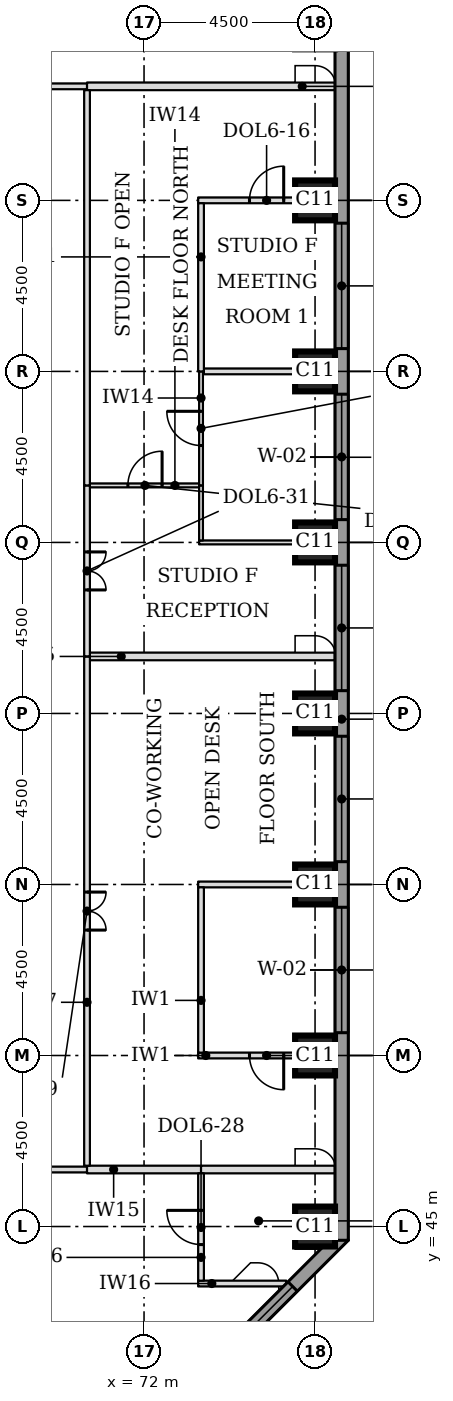
"""IFC4 building model, lengths in metres.
Left out: names, types, materials, properties, quantities, classifications, styles, units other than length and angle.
Written with IfcOpenShell. Run it as: python <this file> out.ifc"""

import sys

from ifc_helpers import new_model, si_unit, direction, frame, frame_2d, origin, origin_2d, place, context, subcontext, project, spatial, rectangle, extrude, element, fill, save


model = new_model("IFC4")
c1 = context("Model", 3, precision=1e-05, world=origin(), true_north=direction((0.0, 1.0)))
c2 = subcontext(c1, "Body", "Model", "MODEL_VIEW")
j1 = project(units=[si_unit("LENGTHUNIT", "METRE"), si_unit("PLANEANGLEUNIT", "RADIAN")], contexts=[c1])
p1 = place(None, origin())
s1 = spatial("IfcSite", under=j1, at=p1, CompositionType="ELEMENT")
p2 = place(p1, origin())
s2 = spatial("IfcBuilding", under=s1, at=p2, CompositionType="ELEMENT")
p3 = place(p2, frame((0.0, 0.0, 115.9)))
s3 = spatial("IfcBuildingStorey", under=s2, at=p3, CompositionType="ELEMENT", Elevation=115.9)
for number, where, z_axis, x_axis in (
    (1, (76.5, 45.0, 0.0), (0.0, 0.0, 1.0), (1.0, 0.0, 0.0)),
    (2, (76.5, 49.5, 0.0), (0.0, 0.0, 1.0), (1.0, 0.0, 0.0)),
    (3, (76.5, 54.0, 0.0), (0.0, 0.0, 1.0), (1.0, 0.0, 0.0)),
    (4, (76.5, 58.5, 0.0), (0.0, 0.0, 1.0), (1.0, 0.0, 0.0)),
    (5, (76.5, 63.0, 0.0), (0.0, 0.0, 1.0), (1.0, 0.0, 0.0)),
    (6, (76.5, 67.5, 0.0), (0.0, 0.0, 1.0), (1.0, 0.0, 0.0)),
    (7, (76.5, 72.0, 0.0), (0.0, 0.0, 1.0), (1.0, 0.0, 0.0)),
):
    element("IfcColumn", number, at=place(p3, frame(where, z_axis=z_axis, x_axis=x_axis)), inside=s3, PredefinedType="COLUMN", context=c2, shape_type="SweptSolid", body=[
        extrude(rectangle(XDim=1.05, YDim=1.05, at=origin_2d()), origin(), (0.0, 0.0, 1.0), 3.7),
    ])
p4 = place(p3, frame((72.239, 39.749, 0.0), z_axis=(0.0, 0.0, 1.0), x_axis=(0.707106781187, 0.707106781187, 0.0)))
e8 = element("IfcWall", 8, at=p4, inside=s3, PredefinedType="STANDARD", context=c2, shape_type="SweptSolid", body=[
    extrude(rectangle(XDim=7.089, YDim=0.35, at=frame_2d((3.544, 0.0))), origin(), (0.0, 0.0, 1.0), 3.525),
])
p5 = place(p4, frame((1.894, 0.0, 0.9)))
e9 = element("IfcOpeningElement", 9, at=p5, cuts=e8, PredefinedType="OPENING", context=c2, shape_type="SweptSolid", body=[
    extrude(rectangle(XDim=3.3, YDim=1.9, at=frame_2d((1.65, 0.95))), frame((0.0, 0.185, 0.0), z_axis=(0.0, -1.0, 0.0), x_axis=(1.0, 0.0, 0.0)), (0.0, 0.0, 1.0), 0.37),
])
p6 = place(p3, frame((77.2, 44.638, 0.0), z_axis=(0.0, 0.0, 1.0), x_axis=(0.0, 1.0, 0.0)))
e10 = element("IfcWall", 10, at=p6, inside=s3, PredefinedType="STANDARD", context=c2, shape_type="SweptSolid", body=[
    extrude(rectangle(XDim=32.225, YDim=0.35, at=frame_2d((16.112, 0.0))), origin(), (0.0, 0.0, 1.0), 3.525),
])
p7 = place(p6, frame((5.462, 0.0, 0.9)))
e11 = element("IfcOpeningElement", 11, at=p7, cuts=e10, PredefinedType="OPENING", context=c2, shape_type="SweptSolid", body=[
    extrude(rectangle(XDim=3.3, YDim=1.9, at=frame_2d((1.65, 0.95))), frame((0.0, 0.185, 0.0), z_axis=(0.0, -1.0, 0.0), x_axis=(1.0, 0.0, 0.0)), (0.0, 0.0, 1.0), 0.37),
])
p8 = place(p6, frame((9.962, 0.0, 0.9)))
e12 = element("IfcOpeningElement", 12, at=p8, cuts=e10, PredefinedType="OPENING", context=c2, shape_type="SweptSolid", body=[
    extrude(rectangle(XDim=3.3, YDim=1.9, at=frame_2d((1.65, 0.95))), frame((0.0, 0.185, 0.0), z_axis=(0.0, -1.0, 0.0), x_axis=(1.0, 0.0, 0.0)), (0.0, 0.0, 1.0), 0.37),
])
p9 = place(p6, frame((14.462, 0.0, 0.9)))
e13 = element("IfcOpeningElement", 13, at=p9, cuts=e10, PredefinedType="OPENING", context=c2, shape_type="SweptSolid", body=[
    extrude(rectangle(XDim=3.3, YDim=1.9, at=frame_2d((1.65, 0.95))), frame((0.0, 0.185, 0.0), z_axis=(0.0, -1.0, 0.0), x_axis=(1.0, 0.0, 0.0)), (0.0, 0.0, 1.0), 0.37),
])
p10 = place(p6, frame((18.962, 0.0, 0.9)))
e14 = element("IfcOpeningElement", 14, at=p10, cuts=e10, PredefinedType="OPENING", context=c2, shape_type="SweptSolid", body=[
    extrude(rectangle(XDim=3.3, YDim=1.9, at=frame_2d((1.65, 0.95))), frame((0.0, 0.185, 0.0), z_axis=(0.0, -1.0, 0.0), x_axis=(1.0, 0.0, 0.0)), (0.0, 0.0, 1.0), 0.37),
])
p11 = place(p6, frame((23.462, 0.0, 0.9)))
e15 = element("IfcOpeningElement", 15, at=p11, cuts=e10, PredefinedType="OPENING", context=c2, shape_type="SweptSolid", body=[
    extrude(rectangle(XDim=3.3, YDim=1.9, at=frame_2d((1.65, 0.95))), frame((0.0, 0.185, 0.0), z_axis=(0.0, -1.0, 0.0), x_axis=(1.0, 0.0, 0.0)), (0.0, 0.0, 1.0), 0.37),
])
p12 = place(p3, frame((73.425, 43.5, 0.0), z_axis=(0.0, 0.0, 1.0), x_axis=(1.0, 0.0, 0.0)))
e16 = element("IfcWall", 16, at=p12, inside=s3, PredefinedType="PARTITIONING", context=c2, shape_type="SweptSolid", body=[
    extrude(rectangle(XDim=2.317, YDim=0.15, at=frame_2d((1.159, 0.0))), origin(), (0.0, 0.0, 1.0), 3.55),
])
p13 = place(p3, frame((54.0, 46.5, 0.0), z_axis=(0.0, 0.0, 1.0), x_axis=(1.0, 0.0, 0.0)))
e17 = element("IfcWall", 17, at=p13, inside=s3, PredefinedType="PARTITIONING", context=c2, shape_type="SweptSolid", body=[
    extrude(rectangle(XDim=16.5, YDim=0.15, at=frame_2d((8.25, 0.0))), origin(), (0.0, 0.0, 1.0), 3.55),
])
p14 = place(p3, frame((70.5, 46.5, 0.0), z_axis=(0.0, 0.0, 1.0), x_axis=(1.0, 0.0, 0.0)))
e18 = element("IfcWall", 18, at=p14, inside=s3, PredefinedType="PARTITIONING", context=c2, shape_type="SweptSolid", body=[
    extrude(rectangle(XDim=3.0, YDim=0.2, at=frame_2d((1.5, 0.0))), origin(), (0.0, 0.0, 1.0), 3.55),
])
p15 = place(p3, frame((73.5, 46.5, 0.0), z_axis=(0.0, 0.0, 1.0), x_axis=(1.0, 0.0, 0.0)))
e19 = element("IfcWall", 19, at=p15, inside=s3, PredefinedType="PARTITIONING", context=c2, shape_type="SweptSolid", body=[
    extrude(rectangle(XDim=3.525, YDim=0.2, at=frame_2d((1.762, 0.0))), origin(), (0.0, 0.0, 1.0), 3.55),
])
p16 = place(p3, frame((73.425, 49.5, 0.0), z_axis=(0.0, 0.0, 1.0), x_axis=(1.0, 0.0, 0.0)))
e20 = element("IfcWall", 20, at=p16, inside=s3, PredefinedType="PARTITIONING", context=c2, shape_type="SweptSolid", body=[
    extrude(rectangle(XDim=3.6, YDim=0.15, at=frame_2d((1.8, 0.0))), origin(), (0.0, 0.0, 1.0), 3.55),
])
p17 = place(p16, frame((1.35, 0.0, 0.0)))
e21 = element("IfcOpeningElement", 21, at=p17, cuts=e20, PredefinedType="OPENING", context=c2, shape_type="SweptSolid", body=[
    extrude(rectangle(XDim=0.9, YDim=2.1, at=frame_2d((0.45, 1.05))), frame((0.0, 0.085, 0.0), z_axis=(0.0, -1.0, 0.0), x_axis=(1.0, 0.0, 0.0)), (0.0, 0.0, 1.0), 0.17),
])
p18 = place(p3, frame((73.425, 54.0, 0.0), z_axis=(0.0, 0.0, 1.0), x_axis=(1.0, 0.0, 0.0)))
e22 = element("IfcWall", 22, at=p18, inside=s3, PredefinedType="PARTITIONING", context=c2, shape_type="SweptSolid", body=[
    extrude(rectangle(XDim=3.6, YDim=0.15, at=frame_2d((1.8, 0.0))), origin(), (0.0, 0.0, 1.0), 3.55),
])
p19 = place(p3, frame((70.575, 60.0, 0.0), z_axis=(0.0, 0.0, 1.0), x_axis=(1.0, 0.0, 0.0)))
e23 = element("IfcWall", 23, at=p19, inside=s3, PredefinedType="PARTITIONING", context=c2, shape_type="SweptSolid", body=[
    extrude(rectangle(XDim=6.45, YDim=0.2, at=frame_2d((3.225, 0.0))), origin(), (0.0, 0.0, 1.0), 3.55),
])
p20 = place(p3, frame((73.45, 63.0, 0.0), z_axis=(0.0, 0.0, 1.0), x_axis=(1.0, 0.0, 0.0)))
e24 = element("IfcWall", 24, at=p20, inside=s3, PredefinedType="PARTITIONING", context=c2, shape_type="SweptSolid", body=[
    extrude(rectangle(XDim=3.575, YDim=0.1, at=frame_2d((1.788, 0.0))), origin(), (0.0, 0.0, 1.0), 3.55),
])
p21 = place(p3, frame((70.575, 64.5, 0.0), z_axis=(0.0, 0.0, 1.0), x_axis=(1.0, 0.0, 0.0)))
e25 = element("IfcWall", 25, at=p21, inside=s3, PredefinedType="PARTITIONING", context=c2, shape_type="SweptSolid", body=[
    extrude(rectangle(XDim=2.875, YDim=0.1, at=frame_2d((1.438, 0.0))), origin(), (0.0, 0.0, 1.0), 3.55),
])
p22 = place(p21, frame((1.0, 0.0, 0.0)))
e26 = element("IfcOpeningElement", 26, at=p22, cuts=e25, PredefinedType="OPENING", context=c2, shape_type="SweptSolid", body=[
    extrude(rectangle(XDim=0.9, YDim=2.1, at=frame_2d((0.45, 1.05))), frame((0.0, 0.06, 0.0), z_axis=(0.0, -1.0, 0.0), x_axis=(1.0, 0.0, 0.0)), (0.0, 0.0, 1.0), 0.12),
])
p23 = place(p3, frame((73.575, 67.5, 0.0), z_axis=(0.0, 0.0, 1.0), x_axis=(1.0, 0.0, 0.0)))
e27 = element("IfcWall", 27, at=p23, inside=s3, PredefinedType="PARTITIONING", context=c2, shape_type="SweptSolid", body=[
    extrude(rectangle(XDim=3.45, YDim=0.15, at=frame_2d((1.725, 0.0))), origin(), (0.0, 0.0, 1.0), 3.55),
])
p24 = place(p3, frame((73.425, 72.0, 0.0), z_axis=(0.0, 0.0, 1.0), x_axis=(1.0, 0.0, 0.0)))
e28 = element("IfcWall", 28, at=p24, inside=s3, PredefinedType="PARTITIONING", context=c2, shape_type="SweptSolid", body=[
    extrude(rectangle(XDim=3.6, YDim=0.15, at=frame_2d((1.8, 0.0))), origin(), (0.0, 0.0, 1.0), 3.55),
])
p25 = place(p24, frame((1.35, 0.0, 0.0)))
e29 = element("IfcOpeningElement", 29, at=p25, cuts=e28, PredefinedType="OPENING", context=c2, shape_type="SweptSolid", body=[
    extrude(rectangle(XDim=0.9, YDim=2.1, at=frame_2d((0.45, 1.05))), frame((0.0, 0.085, 0.0), z_axis=(0.0, -1.0, 0.0), x_axis=(1.0, 0.0, 0.0)), (0.0, 0.0, 1.0), 0.17),
])
p26 = place(p3, frame((58.5, 75.0, 0.0), z_axis=(0.0, 0.0, 1.0), x_axis=(1.0, 0.0, 0.0)))
e30 = element("IfcWall", 30, at=p26, inside=s3, PredefinedType="PARTITIONING", context=c2, shape_type="SweptSolid", body=[
    extrude(rectangle(XDim=12.0, YDim=0.15, at=frame_2d((6.0, 0.0))), origin(), (0.0, 0.0, 1.0), 3.55),
])
p27 = place(p3, frame((70.5, 75.0, 0.0), z_axis=(0.0, 0.0, 1.0), x_axis=(1.0, 0.0, 0.0)))
e31 = element("IfcWall", 31, at=p27, inside=s3, PredefinedType="PARTITIONING", context=c2, shape_type="SweptSolid", body=[
    extrude(rectangle(XDim=6.525, YDim=0.2, at=frame_2d((3.262, 0.0))), origin(), (0.0, 0.0, 1.0), 3.55),
])
p28 = place(p3, frame((73.5, 43.575, 0.0), z_axis=(0.0, 0.0, 1.0), x_axis=(0.0, 1.0, 0.0)))
e32 = element("IfcWall", 32, at=p28, inside=s3, PredefinedType="PARTITIONING", context=c2, shape_type="SweptSolid", body=[
    extrude(rectangle(XDim=2.825, YDim=0.15, at=frame_2d((1.413, 0.0))), origin(), (0.0, 0.0, 1.0), 3.55),
])
p29 = place(p28, frame((0.95, 0.0, 0.0)))
e33 = element("IfcOpeningElement", 33, at=p29, cuts=e32, PredefinedType="OPENING", context=c2, shape_type="SweptSolid", body=[
    extrude(rectangle(XDim=0.9, YDim=2.1, at=frame_2d((0.45, 1.05))), frame((0.0, 0.085, 0.0), z_axis=(0.0, -1.0, 0.0), x_axis=(1.0, 0.0, 0.0)), (0.0, 0.0, 1.0), 0.17),
])
p30 = place(p3, frame((70.5, 46.6, 0.0), z_axis=(0.0, 0.0, 1.0), x_axis=(0.0, 1.0, 0.0)))
e34 = element("IfcWall", 34, at=p30, inside=s3, PredefinedType="PARTITIONING", context=c2, shape_type="SweptSolid", body=[
    extrude(rectangle(XDim=13.4, YDim=0.15, at=frame_2d((6.7, 0.0))), origin(), (0.0, 0.0, 1.0), 3.55),
])
p31 = place(p30, frame((6.2, 0.0, 0.0)))
e35 = element("IfcOpeningElement", 35, at=p31, cuts=e34, PredefinedType="OPENING", context=c2, shape_type="SweptSolid", body=[
    extrude(rectangle(XDim=1.0, YDim=2.1, at=frame_2d((0.5, 1.05))), frame((0.0, 0.085, 0.0), z_axis=(0.0, -1.0, 0.0), x_axis=(1.0, 0.0, 0.0)), (0.0, 0.0, 1.0), 0.17),
])
p32 = place(p3, frame((73.5, 49.575, 0.0), z_axis=(0.0, 0.0, 1.0), x_axis=(0.0, 1.0, 0.0)))
e36 = element("IfcWall", 36, at=p32, inside=s3, PredefinedType="PARTITIONING", context=c2, shape_type="SweptSolid", body=[
    extrude(rectangle(XDim=4.35, YDim=0.15, at=frame_2d((2.175, 0.0))), origin(), (0.0, 0.0, 1.0), 3.55),
])
p33 = place(p3, frame((70.5, 60.0, 0.0), z_axis=(0.0, 0.0, 1.0), x_axis=(0.0, 1.0, 0.0)))
e37 = element("IfcWall", 37, at=p33, inside=s3, PredefinedType="PARTITIONING", context=c2, shape_type="SweptSolid", body=[
    extrude(rectangle(XDim=4.5, YDim=0.15, at=frame_2d((2.25, 0.0))), origin(), (0.0, 0.0, 1.0), 3.55),
])
p34 = place(p33, frame((1.75, 0.0, 0.0)))
e38 = element("IfcOpeningElement", 38, at=p34, cuts=e37, PredefinedType="OPENING", context=c2, shape_type="SweptSolid", body=[
    extrude(rectangle(XDim=1.0, YDim=2.1, at=frame_2d((0.5, 1.05))), frame((0.0, 0.085, 0.0), z_axis=(0.0, -1.0, 0.0), x_axis=(1.0, 0.0, 0.0)), (0.0, 0.0, 1.0), 0.17),
])
p35 = place(p3, frame((73.5, 63.05, 0.0), z_axis=(0.0, 0.0, 1.0), x_axis=(0.0, 1.0, 0.0)))
e39 = element("IfcWall", 39, at=p35, inside=s3, PredefinedType="PARTITIONING", context=c2, shape_type="SweptSolid", body=[
    extrude(rectangle(XDim=1.45, YDim=0.1, at=frame_2d((0.725, 0.0))), origin(), (0.0, 0.0, 1.0), 3.55),
])
p36 = place(p3, frame((70.5, 64.5, 0.0), z_axis=(0.0, 0.0, 1.0), x_axis=(0.0, 1.0, 0.0)))
e40 = element("IfcWall", 40, at=p36, inside=s3, PredefinedType="PARTITIONING", context=c2, shape_type="SweptSolid", body=[
    extrude(rectangle(XDim=10.4, YDim=0.15, at=frame_2d((5.2, 0.0))), origin(), (0.0, 0.0, 1.0), 3.55),
])
p37 = place(p3, frame((73.5, 64.5, 0.0), z_axis=(0.0, 0.0, 1.0), x_axis=(0.0, 1.0, 0.0)))
e41 = element("IfcWall", 41, at=p37, inside=s3, PredefinedType="PARTITIONING", context=c2, shape_type="SweptSolid", body=[
    extrude(rectangle(XDim=3.0, YDim=0.1, at=frame_2d((1.5, 0.0))), origin(), (0.0, 0.0, 1.0), 3.55),
])
p38 = place(p37, frame((1.05, 0.0, 0.0)))
e42 = element("IfcOpeningElement", 42, at=p38, cuts=e41, PredefinedType="OPENING", context=c2, shape_type="SweptSolid", body=[
    extrude(rectangle(XDim=0.9, YDim=2.1, at=frame_2d((0.45, 1.05))), frame((0.0, 0.06, 0.0), z_axis=(0.0, -1.0, 0.0), x_axis=(1.0, 0.0, 0.0)), (0.0, 0.0, 1.0), 0.12),
])
p39 = place(p3, frame((73.5, 67.5, 0.0), z_axis=(0.0, 0.0, 1.0), x_axis=(0.0, 1.0, 0.0)))
e43 = element("IfcWall", 43, at=p39, inside=s3, PredefinedType="PARTITIONING", context=c2, shape_type="SweptSolid", body=[
    extrude(rectangle(XDim=4.425, YDim=0.15, at=frame_2d((2.212, 0.0))), origin(), (0.0, 0.0, 1.0), 3.55),
])
p40 = place(p5, origin())
e44 = element("IfcWindow", 44, at=p40, inside=s3, PartitioningType="SINGLE_PANEL", PredefinedType="WINDOW", context=c2, shape_type="SweptSolid", body=[
    extrude(rectangle(XDim=3.3, YDim=1.9, at=frame_2d((1.65, 0.95))), frame((0.0, 0.085, 0.0), z_axis=(0.0, -1.0, 0.0), x_axis=(1.0, 0.0, 0.0)), (0.0, 0.0, 1.0), 0.06),
])
fill(e9, e44)
p41 = place(p7, origin())
e45 = element("IfcWindow", 45, at=p41, inside=s3, PartitioningType="SINGLE_PANEL", PredefinedType="WINDOW", context=c2, shape_type="SweptSolid", body=[
    extrude(rectangle(XDim=3.3, YDim=1.9, at=frame_2d((1.65, 0.95))), frame((0.0, 0.085, 0.0), z_axis=(0.0, -1.0, 0.0), x_axis=(1.0, 0.0, 0.0)), (0.0, 0.0, 1.0), 0.06),
])
fill(e11, e45)
p42 = place(p8, origin())
e46 = element("IfcWindow", 46, at=p42, inside=s3, PartitioningType="SINGLE_PANEL", PredefinedType="WINDOW", context=c2, shape_type="SweptSolid", body=[
    extrude(rectangle(XDim=3.3, YDim=1.9, at=frame_2d((1.65, 0.95))), frame((0.0, 0.085, 0.0), z_axis=(0.0, -1.0, 0.0), x_axis=(1.0, 0.0, 0.0)), (0.0, 0.0, 1.0), 0.06),
])
fill(e12, e46)
p43 = place(p9, origin())
e47 = element("IfcWindow", 47, at=p43, inside=s3, PartitioningType="SINGLE_PANEL", PredefinedType="WINDOW", context=c2, shape_type="SweptSolid", body=[
    extrude(rectangle(XDim=3.3, YDim=1.9, at=frame_2d((1.65, 0.95))), frame((0.0, 0.085, 0.0), z_axis=(0.0, -1.0, 0.0), x_axis=(1.0, 0.0, 0.0)), (0.0, 0.0, 1.0), 0.06),
])
fill(e13, e47)
p44 = place(p10, origin())
e48 = element("IfcWindow", 48, at=p44, inside=s3, PartitioningType="SINGLE_PANEL", PredefinedType="WINDOW", context=c2, shape_type="SweptSolid", body=[
    extrude(rectangle(XDim=3.3, YDim=1.9, at=frame_2d((1.65, 0.95))), frame((0.0, 0.085, 0.0), z_axis=(0.0, -1.0, 0.0), x_axis=(1.0, 0.0, 0.0)), (0.0, 0.0, 1.0), 0.06),
])
fill(e14, e48)
p45 = place(p11, origin())
e49 = element("IfcWindow", 49, at=p45, inside=s3, PartitioningType="SINGLE_PANEL", PredefinedType="WINDOW", context=c2, shape_type="SweptSolid", body=[
    extrude(rectangle(XDim=3.3, YDim=1.9, at=frame_2d((1.65, 0.95))), frame((0.0, 0.085, 0.0), z_axis=(0.0, -1.0, 0.0), x_axis=(1.0, 0.0, 0.0)), (0.0, 0.0, 1.0), 0.06),
])
fill(e15, e49)
p46 = place(p29, origin())
e50 = element("IfcDoor", 50, at=p46, inside=s3, OperationType="SINGLE_SWING_RIGHT", PredefinedType="DOOR", context=c2, shape_type="SweptSolid", body=[
    extrude(rectangle(XDim=0.9, YDim=2.1, at=frame_2d((0.45, 1.05))), frame((0.0, 0.025, 0.0), z_axis=(0.0, -1.0, 0.0), x_axis=(1.0, 0.0, 0.0)), (0.0, 0.0, 1.0), 0.05),
])
fill(e33, e50)
p47 = place(p31, frame((1.0, 0.0, 0.0), z_axis=(0.0, 0.0, 1.0), x_axis=(-1.0, 0.0, 0.0)))
e51 = element("IfcDoor", 51, at=p47, inside=s3, OperationType="DOUBLE_DOOR_SINGLE_SWING", PredefinedType="DOOR", context=c2, shape_type="SweptSolid", body=[
    extrude(rectangle(XDim=1.0, YDim=2.1, at=frame_2d((0.5, 1.05))), frame((0.0, 0.025, 0.0), z_axis=(0.0, -1.0, 0.0), x_axis=(1.0, 0.0, 0.0)), (0.0, 0.0, 1.0), 0.05),
])
fill(e35, e51)
p48 = place(p17, frame((0.9, 0.0, 0.0), z_axis=(0.0, 0.0, 1.0), x_axis=(-1.0, 0.0, 0.0)))
e52 = element("IfcDoor", 52, at=p48, inside=s3, OperationType="SINGLE_SWING_LEFT", PredefinedType="DOOR", context=c2, shape_type="SweptSolid", body=[
    extrude(rectangle(XDim=0.9, YDim=2.1, at=frame_2d((0.45, 1.05))), frame((0.0, 0.025, 0.0), z_axis=(0.0, -1.0, 0.0), x_axis=(1.0, 0.0, 0.0)), (0.0, 0.0, 1.0), 0.05),
])
fill(e21, e52)
p49 = place(p34, frame((1.0, 0.0, 0.0), z_axis=(0.0, 0.0, 1.0), x_axis=(-1.0, 0.0, 0.0)))
e53 = element("IfcDoor", 53, at=p49, inside=s3, OperationType="DOUBLE_DOOR_SINGLE_SWING", PredefinedType="DOOR", context=c2, shape_type="SweptSolid", body=[
    extrude(rectangle(XDim=1.0, YDim=2.1, at=frame_2d((0.5, 1.05))), frame((0.0, 0.025, 0.0), z_axis=(0.0, -1.0, 0.0), x_axis=(1.0, 0.0, 0.0)), (0.0, 0.0, 1.0), 0.05),
])
fill(e38, e53)
p50 = place(p22, origin())
e54 = element("IfcDoor", 54, at=p50, inside=s3, OperationType="SINGLE_SWING_RIGHT", PredefinedType="DOOR", context=c2, shape_type="SweptSolid", body=[
    extrude(rectangle(XDim=0.9, YDim=2.1, at=frame_2d((0.45, 1.05))), frame((0.0, 0.025, 0.0), z_axis=(0.0, -1.0, 0.0), x_axis=(1.0, 0.0, 0.0)), (0.0, 0.0, 1.0), 0.05),
])
fill(e26, e54)
p51 = place(p38, origin())
e55 = element("IfcDoor", 55, at=p51, inside=s3, OperationType="SINGLE_SWING_RIGHT", PredefinedType="DOOR", context=c2, shape_type="SweptSolid", body=[
    extrude(rectangle(XDim=0.9, YDim=2.1, at=frame_2d((0.45, 1.05))), frame((0.0, 0.025, 0.0), z_axis=(0.0, -1.0, 0.0), x_axis=(1.0, 0.0, 0.0)), (0.0, 0.0, 1.0), 0.05),
])
fill(e42, e55)
p52 = place(p25, origin())
e56 = element("IfcDoor", 56, at=p52, inside=s3, OperationType="SINGLE_SWING_RIGHT", PredefinedType="DOOR", context=c2, shape_type="SweptSolid", body=[
    extrude(rectangle(XDim=0.9, YDim=2.1, at=frame_2d((0.45, 1.05))), frame((0.0, 0.025, 0.0), z_axis=(0.0, -1.0, 0.0), x_axis=(1.0, 0.0, 0.0)), (0.0, 0.0, 1.0), 0.05),
])
fill(e29, e56)
save(model, sys.argv[1])
